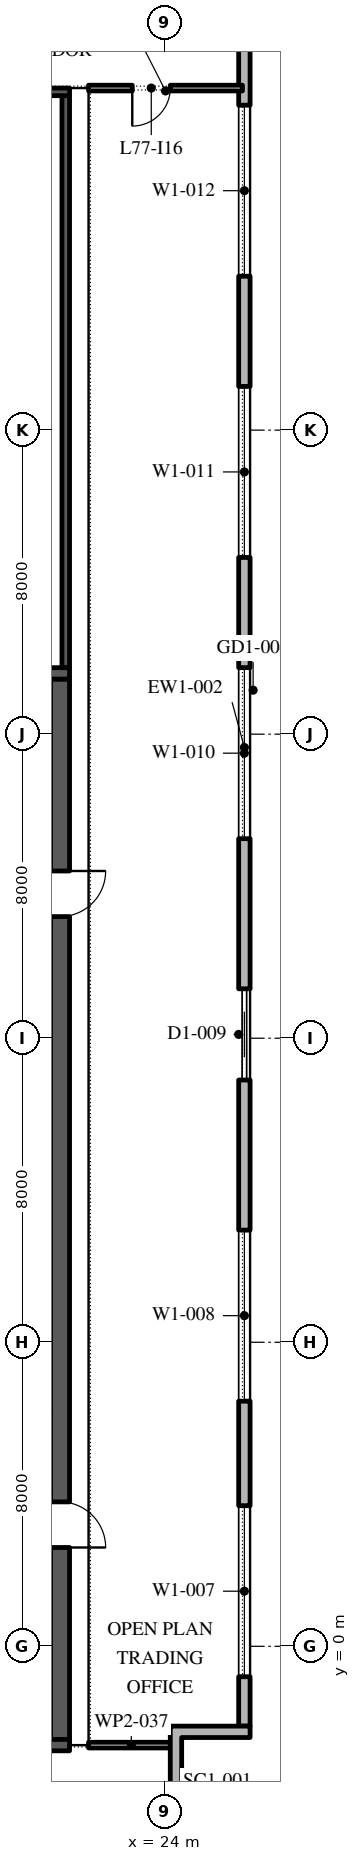
"""IFC4 building model, lengths in metres.
Left out: names, types, materials, properties, quantities, classifications, styles, units other than length and angle.
Written with IfcOpenShell. Run it as: python <this file> out.ifc"""

import sys

from ifc_helpers import new_model, si_unit, direction, frame, frame_2d, origin, place, context, subcontext, project, spatial, polyline, rectangle, outline, extrude, element, fill, save


model = new_model("IFC4")
c1 = context("Model", 3, precision=1e-05, world=origin(), true_north=direction((0.0, 1.0)))
c2 = subcontext(c1, "Body", "Model", "MODEL_VIEW")
j1 = project(units=[si_unit("LENGTHUNIT", "METRE"), si_unit("PLANEANGLEUNIT", "RADIAN")], contexts=[c1])
p1 = place(None, origin())
s1 = spatial("IfcSite", under=j1, at=p1, CompositionType="ELEMENT")
p2 = place(p1, origin())
s2 = spatial("IfcBuilding", under=s1, at=p2, CompositionType="ELEMENT")
p3 = place(p2, frame((0.0, 0.0, 351.0)))
s3 = spatial("IfcBuildingStorey", under=s2, at=p3, CompositionType="ELEMENT", Elevation=351.0)
p4 = place(p3, frame((26.1, -2.1, 0.0), z_axis=(0.0, 0.0, 1.0), x_axis=(0.0, 1.0, 0.0)))
e1 = element("IfcWall", 1, at=p4, inside=s3, PredefinedType="STANDARD", context=c2, shape_type="SweptSolid", body=[
    extrude(rectangle(XDim=51.5, YDim=0.3, at=frame_2d((25.75, 0.0))), origin(), (0.0, 0.0, 1.0), 4.0),
])
p5 = place(p4, frame((1.3, 0.0, 0.45)))
e2 = element("IfcOpeningElement", 2, at=p5, cuts=e1, PredefinedType="OPENING", context=c2, shape_type="SweptSolid", body=[
    extrude(rectangle(XDim=4.5, YDim=3.05, at=frame_2d((2.25, 1.525))), frame((0.0, 0.16, 0.0), z_axis=(0.0, -1.0, 0.0), x_axis=(1.0, 0.0, 0.0)), (0.0, 0.0, 1.0), 0.32),
])
p6 = place(p4, frame((8.55, 0.0, 0.45)))
e3 = element("IfcOpeningElement", 3, at=p6, cuts=e1, PredefinedType="OPENING", context=c2, shape_type="SweptSolid", body=[
    extrude(rectangle(XDim=4.5, YDim=3.05, at=frame_2d((2.25, 1.525))), frame((0.0, 0.16, 0.0), z_axis=(0.0, -1.0, 0.0), x_axis=(1.0, 0.0, 0.0)), (0.0, 0.0, 1.0), 0.32),
])
p7 = place(p4, frame((17.0, 0.0, 0.0)))
e4 = element("IfcOpeningElement", 4, at=p7, cuts=e1, PredefinedType="OPENING", context=c2, shape_type="SweptSolid", body=[
    extrude(rectangle(XDim=2.4, YDim=3.5, at=frame_2d((1.2, 1.75))), frame((0.0, 0.16, 0.0), z_axis=(0.0, -1.0, 0.0), x_axis=(1.0, 0.0, 0.0)), (0.0, 0.0, 1.0), 0.32),
])
p8 = place(p4, frame((23.35, 0.0, 0.45)))
e5 = element("IfcOpeningElement", 5, at=p8, cuts=e1, PredefinedType="OPENING", context=c2, shape_type="SweptSolid", body=[
    extrude(rectangle(XDim=4.5, YDim=3.05, at=frame_2d((2.25, 1.525))), frame((0.0, 0.16, 0.0), z_axis=(0.0, -1.0, 0.0), x_axis=(1.0, 0.0, 0.0)), (0.0, 0.0, 1.0), 0.32),
])
p9 = place(p4, frame((30.75, 0.0, 0.45)))
e6 = element("IfcOpeningElement", 6, at=p9, cuts=e1, PredefinedType="OPENING", context=c2, shape_type="SweptSolid", body=[
    extrude(rectangle(XDim=4.5, YDim=3.05, at=frame_2d((2.25, 1.525))), frame((0.0, 0.16, 0.0), z_axis=(0.0, -1.0, 0.0), x_axis=(1.0, 0.0, 0.0)), (0.0, 0.0, 1.0), 0.32),
])
p10 = place(p4, frame((38.15, 0.0, 0.45)))
e7 = element("IfcOpeningElement", 7, at=p10, cuts=e1, PredefinedType="OPENING", context=c2, shape_type="SweptSolid", body=[
    extrude(rectangle(XDim=4.5, YDim=3.05, at=frame_2d((2.25, 1.525))), frame((0.0, 0.16, 0.0), z_axis=(0.0, -1.0, 0.0), x_axis=(1.0, 0.0, 0.0)), (0.0, 0.0, 1.0), 0.32),
])
p11 = place(p4, frame((46.6, 0.0, 0.0)))
e8 = element("IfcOpeningElement", 8, at=p11, cuts=e1, PredefinedType="OPENING", context=c2, shape_type="SweptSolid", body=[
    extrude(rectangle(XDim=2.4, YDim=3.5, at=frame_2d((1.2, 1.75))), frame((0.0, 0.16, 0.0), z_axis=(0.0, -1.0, 0.0), x_axis=(1.0, 0.0, 0.0)), (0.0, 0.0, 1.0), 0.32),
])
p12 = place(p3, origin())
e9 = element("IfcWall", 9, at=p12, inside=s3, PredefinedType="STANDARD", context=c2, shape_type="SweptSolid", body=[
    extrude(outline(polyline([(24.15, -3.9), (24.15, -2.1), (26.25, -2.1), (26.25, -2.4), (24.45, -2.4), (24.45, -4.2), (22.65, -4.2), (22.65, -5.7), (22.35, -5.7), (22.35, -3.9), (24.15, -3.9)])), origin(), (0.0, 0.0, 1.0), 4.0),
])
p13 = place(p3, frame((21.25, -2.45, 0.0), z_axis=(0.0, 0.0, 1.0), x_axis=(0.0, 1.0, 0.0)))
e10 = element("IfcWall", 10, at=p13, inside=s3, PredefinedType="SHEAR", context=c2, shape_type="SweptSolid", body=[
    extrude(rectangle(XDim=27.9, YDim=0.5, at=frame_2d((13.95, 0.0))), origin(), (0.0, 0.0, 1.0), 4.0),
])
p14 = place(p13, frame((5.05, 0.0, 0.0)))
e11 = element("IfcOpeningElement", 11, at=p14, cuts=e10, PredefinedType="OPENING", context=c2, shape_type="SweptSolid", body=[
    extrude(rectangle(XDim=1.2, YDim=2.1, at=frame_2d((0.6, 1.05))), frame((0.0, 0.26, 0.0), z_axis=(0.0, -1.0, 0.0), x_axis=(1.0, 0.0, 0.0)), (0.0, 0.0, 1.0), 0.52),
])
p15 = place(p13, frame((21.65, 0.0, 0.0)))
e12 = element("IfcOpeningElement", 12, at=p15, cuts=e10, PredefinedType="OPENING", context=c2, shape_type="SweptSolid", body=[
    extrude(rectangle(XDim=1.2, YDim=2.1, at=frame_2d((0.6, 1.05))), frame((0.0, 0.26, 0.0), z_axis=(0.0, -1.0, 0.0), x_axis=(1.0, 0.0, 0.0)), (0.0, 0.0, 1.0), 0.52),
])
for number, where, z_axis, x_axis in (
    (13, (10.5, -2.6, 0.0), (0.0, 0.0, 1.0), (1.0, 0.0, 0.0)),
    (14, (10.5, 25.6, 0.0), (0.0, 0.0, 1.0), (1.0, 0.0, 0.0)),
):
    element("IfcWall", number, at=place(p3, frame(where, z_axis=z_axis, x_axis=x_axis)), inside=s3, PredefinedType="SHEAR", context=c2, shape_type="SweptSolid", body=[
        extrude(rectangle(XDim=11.0, YDim=0.3, at=frame_2d((5.5, 0.0))), origin(), (0.0, 0.0, 1.0), 4.0),
    ])
p16 = place(p3, frame((21.4, 25.75, 0.0), z_axis=(0.0, 0.0, 1.0), x_axis=(0.0, 1.0, 0.0)))
e15 = element("IfcWall", 15, at=p16, inside=s3, PredefinedType="SHEAR", context=c2, shape_type="SweptSolid", body=[
    extrude(rectangle(XDim=15.05, YDim=0.2, at=frame_2d((7.525, 0.0))), origin(), (0.0, 0.0, 1.0), 4.0),
])
p17 = place(p3, frame((10.5, 40.9, 0.0), z_axis=(0.0, 0.0, 1.0), x_axis=(1.0, 0.0, 0.0)))
e16 = element("IfcWall", 16, at=p17, inside=s3, PredefinedType="SHEAR", context=c2, shape_type="SweptSolid", body=[
    extrude(rectangle(XDim=11.0, YDim=0.2, at=frame_2d((5.5, 0.0))), origin(), (0.0, 0.0, 1.0), 4.0),
])
p18 = place(p3, frame((22.0, -2.6, 0.0), z_axis=(0.0, 0.0, 1.0), x_axis=(1.0, 0.0, 0.0)))
e17 = element("IfcWall", 17, at=p18, inside=s3, PredefinedType="PARTITIONING", context=c2, shape_type="SweptSolid", body=[
    extrude(rectangle(XDim=2.25, YDim=0.15, at=frame_2d((1.125, 0.0))), origin(), (0.0, 0.0, 1.0), 4.0),
])
p19 = place(p3, frame((26.05, 41.0, 0.0), z_axis=(0.0, 0.0, 1.0), x_axis=(-1.0, 0.0, 0.0)))
e18 = element("IfcWall", 18, at=p19, inside=s3, PredefinedType="PARTITIONING", context=c2, shape_type="SweptSolid", body=[
    extrude(rectangle(XDim=4.05, YDim=0.15, at=frame_2d((2.025, 0.0))), origin(), (0.0, 0.0, 1.0), 4.0),
])
p20 = place(p19, frame((1.9, 0.0, 0.0)))
e19 = element("IfcOpeningElement", 19, at=p20, cuts=e18, PredefinedType="OPENING", context=c2, shape_type="SweptSolid", body=[
    extrude(rectangle(XDim=1.0, YDim=2.1, at=frame_2d((0.5, 1.05))), frame((0.0, 0.085, 0.0), z_axis=(0.0, -1.0, 0.0), x_axis=(1.0, 0.0, 0.0)), (0.0, 0.0, 1.0), 0.17),
])
p21 = place(p5, origin())
e20 = element("IfcWindow", 20, at=p21, inside=s3, PartitioningType="DOUBLE_PANEL_VERTICAL", PredefinedType="WINDOW", context=c2, shape_type="SweptSolid", body=[
    extrude(rectangle(XDim=4.5, YDim=3.05, at=frame_2d((2.25, 1.525))), frame((0.0, 0.03, 0.0), z_axis=(0.0, -1.0, 0.0), x_axis=(1.0, 0.0, 0.0)), (0.0, 0.0, 1.0), 0.06),
])
fill(e2, e20)
p22 = place(p6, origin())
e21 = element("IfcWindow", 21, at=p22, inside=s3, PartitioningType="DOUBLE_PANEL_VERTICAL", PredefinedType="WINDOW", context=c2, shape_type="SweptSolid", body=[
    extrude(rectangle(XDim=4.5, YDim=3.05, at=frame_2d((2.25, 1.525))), frame((0.0, 0.03, 0.0), z_axis=(0.0, -1.0, 0.0), x_axis=(1.0, 0.0, 0.0)), (0.0, 0.0, 1.0), 0.06),
])
fill(e3, e21)
p23 = place(p7, origin())
e22 = element("IfcDoor", 22, at=p23, inside=s3, OperationType="DOUBLE_DOOR_SLIDING", PredefinedType="DOOR", context=c2, shape_type="SweptSolid", body=[
    extrude(rectangle(XDim=2.4, YDim=3.5, at=frame_2d((1.2, 1.75))), frame((0.0, 0.025, 0.0), z_axis=(0.0, -1.0, 0.0), x_axis=(1.0, 0.0, 0.0)), (0.0, 0.0, 1.0), 0.05),
])
fill(e4, e22)
p24 = place(p8, origin())
e23 = element("IfcWindow", 23, at=p24, inside=s3, PartitioningType="DOUBLE_PANEL_VERTICAL", PredefinedType="WINDOW", context=c2, shape_type="SweptSolid", body=[
    extrude(rectangle(XDim=4.5, YDim=3.05, at=frame_2d((2.25, 1.525))), frame((0.0, 0.03, 0.0), z_axis=(0.0, -1.0, 0.0), x_axis=(1.0, 0.0, 0.0)), (0.0, 0.0, 1.0), 0.06),
])
fill(e5, e23)
p25 = place(p9, origin())
e24 = element("IfcWindow", 24, at=p25, inside=s3, PartitioningType="DOUBLE_PANEL_VERTICAL", PredefinedType="WINDOW", context=c2, shape_type="SweptSolid", body=[
    extrude(rectangle(XDim=4.5, YDim=3.05, at=frame_2d((2.25, 1.525))), frame((0.0, 0.03, 0.0), z_axis=(0.0, -1.0, 0.0), x_axis=(1.0, 0.0, 0.0)), (0.0, 0.0, 1.0), 0.06),
])
fill(e6, e24)
p26 = place(p10, origin())
e25 = element("IfcWindow", 25, at=p26, inside=s3, PartitioningType="DOUBLE_PANEL_VERTICAL", PredefinedType="WINDOW", context=c2, shape_type="SweptSolid", body=[
    extrude(rectangle(XDim=4.5, YDim=3.05, at=frame_2d((2.25, 1.525))), frame((0.0, 0.03, 0.0), z_axis=(0.0, -1.0, 0.0), x_axis=(1.0, 0.0, 0.0)), (0.0, 0.0, 1.0), 0.06),
])
fill(e7, e25)
p27 = place(p14, frame((1.2, 0.0, 0.0), z_axis=(0.0, 0.0, 1.0), x_axis=(-1.0, 0.0, 0.0)))
e26 = element("IfcDoor", 26, at=p27, inside=s3, OperationType="SINGLE_SWING_LEFT", PredefinedType="DOOR", context=c2, shape_type="SweptSolid", body=[
    extrude(rectangle(XDim=1.2, YDim=2.1, at=frame_2d((0.6, 1.05))), frame((0.0, 0.025, 0.0), z_axis=(0.0, -1.0, 0.0), x_axis=(1.0, 0.0, 0.0)), (0.0, 0.0, 1.0), 0.05),
])
fill(e11, e26)
p28 = place(p15, frame((1.2, 0.0, 0.0), z_axis=(0.0, 0.0, 1.0), x_axis=(-1.0, 0.0, 0.0)))
e27 = element("IfcDoor", 27, at=p28, inside=s3, OperationType="SINGLE_SWING_RIGHT", PredefinedType="DOOR", context=c2, shape_type="SweptSolid", body=[
    extrude(rectangle(XDim=1.2, YDim=2.1, at=frame_2d((0.6, 1.05))), frame((0.0, 0.025, 0.0), z_axis=(0.0, -1.0, 0.0), x_axis=(1.0, 0.0, 0.0)), (0.0, 0.0, 1.0), 0.05),
])
fill(e12, e27)
p29 = place(p20, origin())
e28 = element("IfcDoor", 28, at=p29, inside=s3, OperationType="SINGLE_SWING_LEFT", PredefinedType="DOOR", context=c2, shape_type="SweptSolid", body=[
    extrude(rectangle(XDim=1.0, YDim=2.1, at=frame_2d((0.5, 1.05))), frame((0.0, 0.025, 0.0), z_axis=(0.0, -1.0, 0.0), x_axis=(1.0, 0.0, 0.0)), (0.0, 0.0, 1.0), 0.05),
])
fill(e19, e28)
save(model, sys.argv[1])
